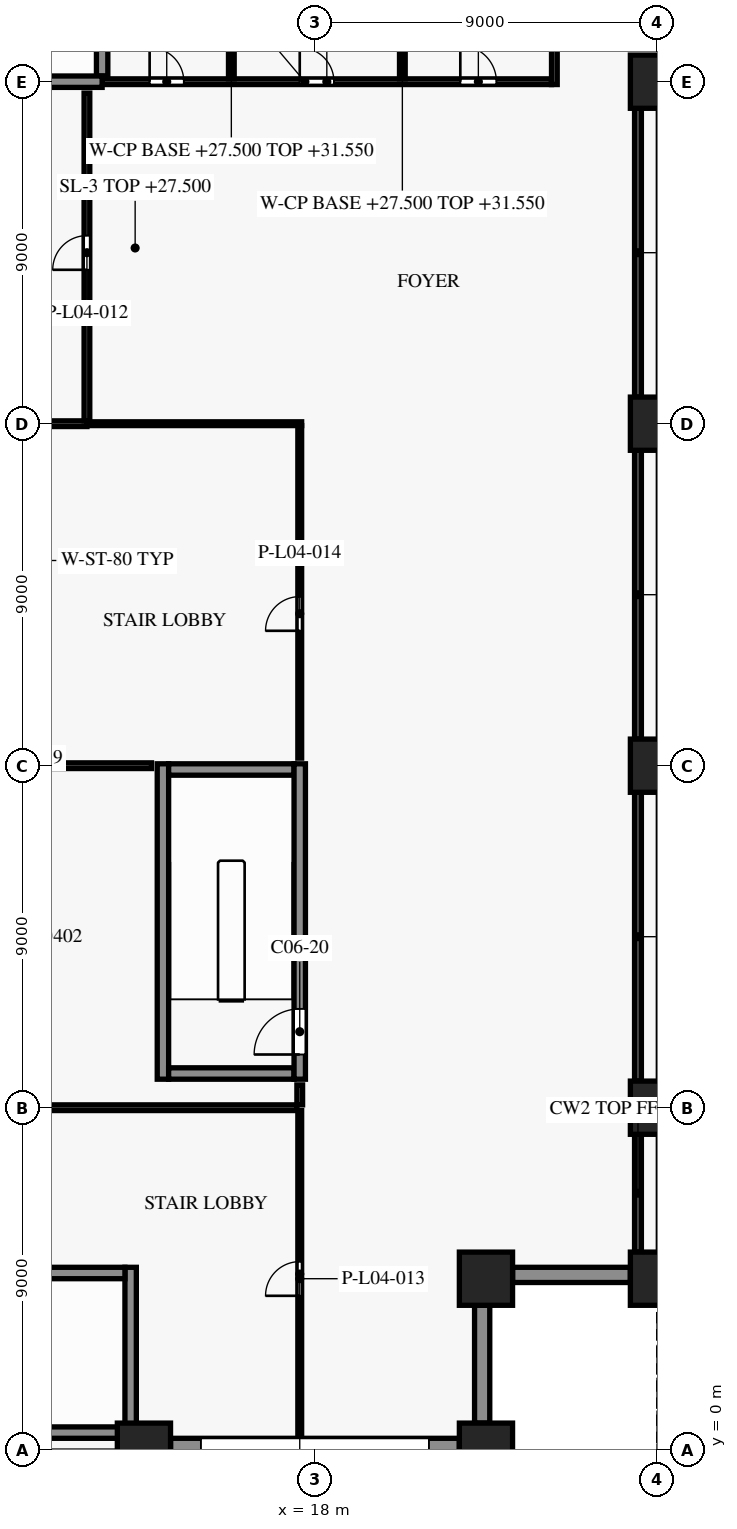
"""IFC4 building model, lengths in metres.
Left out: names, types, materials, properties, quantities, classifications, styles, units other than length and angle.
Written with IfcOpenShell. Run it as: python <this file> out.ifc"""

import sys

from ifc_helpers import new_model, si_unit, direction, frame, frame_2d, origin, origin_2d, place, context, subcontext, project, spatial, rectangle, extrude, element, fill, save


model = new_model("IFC4")
c1 = context("Model", 3, precision=1e-05, world=origin(), true_north=direction((0.0, 1.0)))
c2 = subcontext(c1, "Body", "Model", "MODEL_VIEW")
j1 = project(units=[si_unit("LENGTHUNIT", "METRE"), si_unit("PLANEANGLEUNIT", "RADIAN")], contexts=[c1])
p1 = place(None, origin())
s1 = spatial("IfcSite", under=j1, at=p1, CompositionType="ELEMENT")
p2 = place(p1, origin())
s2 = spatial("IfcBuilding", under=s1, at=p2, CompositionType="ELEMENT")
p3 = place(p2, frame((0.0, 0.0, 27.5)))
s3 = spatial("IfcBuildingStorey", under=s2, at=p3, CompositionType="ELEMENT", Elevation=27.5)
for number, where, z_axis, x_axis in (
    (1, (13.5, 0.0, 0.0), (0.0, 0.0, 1.0), (1.0, 0.0, 0.0)),
    (2, (22.5, 0.0, 0.0), (0.0, 0.0, 1.0), (1.0, 0.0, 0.0)),
    (3, (27.0, 4.5, 0.0), (0.0, 0.0, 1.0), (1.0, 0.0, 0.0)),
    (4, (27.0, 9.0, 0.0), (0.0, 0.0, 1.0), (1.0, 0.0, 0.0)),
    (5, (27.0, 18.0, 0.0), (0.0, 0.0, 1.0), (1.0, 0.0, 0.0)),
    (6, (27.0, 27.0, 0.0), (0.0, 0.0, 1.0), (1.0, 0.0, 0.0)),
    (7, (27.0, 36.0, 0.0), (0.0, 0.0, 1.0), (1.0, 0.0, 0.0)),
    (8, (22.5, 4.5, 0.0), (0.0, 0.0, 1.0), (1.0, 0.0, 0.0)),
):
    element("IfcColumn", number, at=place(p3, frame(where, z_axis=z_axis, x_axis=x_axis)), inside=s3, PredefinedType="COLUMN", context=c2, shape_type="SweptSolid", body=[
        extrude(rectangle(XDim=1.4, YDim=1.4, at=origin_2d()), origin(), (0.0, 0.0, 1.0), 4.5),
    ])
p4 = place(p3, frame((21.8, 0.1, 0.0), z_axis=(0.0, 0.0, 1.0), x_axis=(-1.0, 0.0, 0.0)))
e9 = element("IfcWall", 9, at=p4, inside=s3, PredefinedType="SOLIDWALL", context=c2, shape_type="SweptSolid", body=[
    extrude(rectangle(XDim=7.6, YDim=0.4, at=frame_2d((3.8, 0.0))), origin(), (0.0, 0.0, 1.0), 3.6),
])
p5 = place(p4, frame((0.8, 0.0, 0.9)))
e10 = element("IfcOpeningElement", 10, at=p5, cuts=e9, PredefinedType="OPENING", context=c2, shape_type="SweptSolid", body=[
    extrude(rectangle(XDim=6.0, YDim=1.8, at=frame_2d((3.0, 0.9))), frame((0.0, 0.21, 0.0), z_axis=(0.0, -1.0, 0.0), x_axis=(1.0, 0.0, 0.0)), (0.0, 0.0, 1.0), 0.42),
])
for number, where, z_axis, x_axis in (
    (11, (22.4, 3.8, 0.0), (0.0, 0.0, 1.0), (0.0, -1.0, 0.0)),
    (12, (26.3, 4.6, 0.0), (0.0, 0.0, 1.0), (-1.0, 0.0, 0.0)),
):
    element("IfcWall", number, at=place(p3, frame(where, z_axis=z_axis, x_axis=x_axis)), inside=s3, PredefinedType="SOLIDWALL", context=c2, shape_type="SweptSolid", body=[
        extrude(rectangle(XDim=3.1, YDim=0.4, at=frame_2d((1.55, 0.0))), origin(), (0.0, 0.0, 1.0), 3.6),
    ])
p6 = place(p3, frame((5.0, 0.45, 0.0), z_axis=(0.0, 0.0, 1.0), x_axis=(1.0, 0.0, 0.0)))
e13 = element("IfcWall", 13, at=p6, inside=s3, PredefinedType="SHEAR", context=c2, shape_type="SweptSolid", body=[
    extrude(rectangle(XDim=8.0, YDim=0.3, at=frame_2d((4.0, 0.0))), origin(), (0.0, 0.0, 1.0), 4.2),
])
p7 = place(p3, frame((5.0, 4.65, 0.0), z_axis=(0.0, 0.0, 1.0), x_axis=(1.0, 0.0, 0.0)))
e14 = element("IfcWall", 14, at=p7, inside=s3, PredefinedType="SHEAR", context=c2, shape_type="SweptSolid", body=[
    extrude(rectangle(XDim=8.0, YDim=0.3, at=frame_2d((4.0, 0.0))), origin(), (0.0, 0.0, 1.0), 4.2),
])
p8 = place(p7, frame((0.5, 0.0, 0.0)))
e15 = element("IfcOpeningElement", 15, at=p8, cuts=e14, PredefinedType="OPENING", context=c2, shape_type="SweptSolid", body=[
    extrude(rectangle(XDim=1.2, YDim=2.2, at=frame_2d((0.6, 1.1))), frame((0.0, 0.16, 0.0), z_axis=(0.0, -1.0, 0.0), x_axis=(1.0, 0.0, 0.0)), (0.0, 0.0, 1.0), 0.32),
])
for number, where, z_axis, x_axis in (
    (16, (14.15, 9.9, 0.0), (0.0, 0.0, 1.0), (1.0, 0.0, 0.0)),
    (17, (14.15, 17.9, 0.0), (0.0, 0.0, 1.0), (1.0, 0.0, 0.0)),
):
    element("IfcWall", number, at=place(p3, frame(where, z_axis=z_axis, x_axis=x_axis)), inside=s3, PredefinedType="SHEAR", context=c2, shape_type="SweptSolid", body=[
        extrude(rectangle(XDim=3.3, YDim=0.3, at=frame_2d((1.65, 0.0))), origin(), (0.0, 0.0, 1.0), 4.2),
    ])
p9 = place(p3, frame((12.4, 36.0, 0.0), z_axis=(0.0, 0.0, 1.0), x_axis=(1.0, 0.0, 0.0)))
e18 = element("IfcWall", 18, at=p9, inside=s3, PredefinedType="SHEAR", context=c2, shape_type="SweptSolid", body=[
    extrude(rectangle(XDim=11.825, YDim=0.15, at=frame_2d((5.913, 0.0))), origin(), (0.0, 0.0, 1.0), 4.2),
])
p10 = place(p9, frame((1.25, 0.0, 0.0)))
e19 = element("IfcOpeningElement", 19, at=p10, cuts=e18, PredefinedType="OPENING", context=c2, shape_type="SweptSolid", body=[
    extrude(rectangle(XDim=0.9, YDim=2.1, at=frame_2d((0.45, 1.05))), frame((0.0, 0.085, 0.0), z_axis=(0.0, -1.0, 0.0), x_axis=(1.0, 0.0, 0.0)), (0.0, 0.0, 1.0), 0.17),
])
p11 = place(p9, frame((5.2, 0.0, 0.0)))
e20 = element("IfcOpeningElement", 20, at=p11, cuts=e18, PredefinedType="OPENING", context=c2, shape_type="SweptSolid", body=[
    extrude(rectangle(XDim=0.9, YDim=2.1, at=frame_2d((0.45, 1.05))), frame((0.0, 0.085, 0.0), z_axis=(0.0, -1.0, 0.0), x_axis=(1.0, 0.0, 0.0)), (0.0, 0.0, 1.0), 0.17),
])
p12 = place(p9, frame((9.425, 0.0, 0.0)))
e21 = element("IfcOpeningElement", 21, at=p12, cuts=e18, PredefinedType="OPENING", context=c2, shape_type="SweptSolid", body=[
    extrude(rectangle(XDim=0.95, YDim=2.1, at=frame_2d((0.475, 1.05))), frame((0.0, 0.085, 0.0), z_axis=(0.0, -1.0, 0.0), x_axis=(1.0, 0.0, 0.0)), (0.0, 0.0, 1.0), 0.17),
])
p13 = place(p3, frame((4.4, 36.0, 0.0), z_axis=(0.0, 0.0, 1.0), x_axis=(1.0, 0.0, 0.0)))
e22 = element("IfcWall", 22, at=p13, inside=s3, PredefinedType="SHEAR", context=c2, shape_type="SweptSolid", body=[
    extrude(rectangle(XDim=8.0, YDim=0.3, at=frame_2d((4.0, 0.0))), origin(), (0.0, 0.0, 1.0), 4.2),
])
p14 = place(p13, frame((0.3, 0.0, 0.0)))
e23 = element("IfcOpeningElement", 23, at=p14, cuts=e22, PredefinedType="OPENING", context=c2, shape_type="SweptSolid", body=[
    extrude(rectangle(XDim=1.5, YDim=2.2, at=frame_2d((0.75, 1.1))), frame((0.0, 0.16, 0.0), z_axis=(0.0, -1.0, 0.0), x_axis=(1.0, 0.0, 0.0)), (0.0, 0.0, 1.0), 0.32),
])
p15 = place(p3, frame((12.4, 36.15, 0.0), z_axis=(0.0, 0.0, 1.0), x_axis=(0.0, 1.0, 0.0)))
e24 = element("IfcWall", 24, at=p15, inside=s3, PredefinedType="SHEAR", context=c2, shape_type="SweptSolid", body=[
    extrude(rectangle(XDim=3.725, YDim=0.3, at=frame_2d((1.863, 0.0))), origin(), (0.0, 0.0, 1.0), 4.2),
])
p16 = place(p3, frame((13.15, 0.3, 0.0), z_axis=(0.0, 0.0, 1.0), x_axis=(0.0, 1.0, 0.0)))
e25 = element("IfcWall", 25, at=p16, inside=s3, PredefinedType="SHEAR", context=c2, shape_type="SweptSolid", body=[
    extrude(rectangle(XDim=4.5, YDim=0.3, at=frame_2d((2.25, 0.0))), origin(), (0.0, 0.0, 1.0), 4.2),
])
p17 = place(p3, frame((14.0, 9.75, 0.0), z_axis=(0.0, 0.0, 1.0), x_axis=(0.0, 1.0, 0.0)))
e26 = element("IfcWall", 26, at=p17, inside=s3, PredefinedType="SHEAR", context=c2, shape_type="SweptSolid", body=[
    extrude(rectangle(XDim=8.3, YDim=0.3, at=frame_2d((4.15, 0.0))), origin(), (0.0, 0.0, 1.0), 4.2),
])
p18 = place(p3, frame((15.8, 36.075, 0.0), z_axis=(0.0, 0.0, 1.0), x_axis=(0.0, 1.0, 0.0)))
e27 = element("IfcWall", 27, at=p18, inside=s3, PredefinedType="PARTITIONING", context=c2, shape_type="SweptSolid", body=[
    extrude(rectangle(XDim=3.8, YDim=0.15, at=frame_2d((1.9, 0.0))), origin(), (0.0, 0.0, 1.0), 4.05),
])
p19 = place(p3, frame((17.6, 9.75, 0.0), z_axis=(0.0, 0.0, 1.0), x_axis=(0.0, 1.0, 0.0)))
e28 = element("IfcWall", 28, at=p19, inside=s3, PredefinedType="SHEAR", context=c2, shape_type="SweptSolid", body=[
    extrude(rectangle(XDim=8.3, YDim=0.3, at=frame_2d((4.15, 0.0))), origin(), (0.0, 0.0, 1.0), 4.2),
])
p20 = place(p19, frame((0.65, 0.0, 0.0)))
e29 = element("IfcOpeningElement", 29, at=p20, cuts=e28, PredefinedType="OPENING", context=c2, shape_type="SweptSolid", body=[
    extrude(rectangle(XDim=1.2, YDim=2.2, at=frame_2d((0.6, 1.1))), frame((0.0, 0.16, 0.0), z_axis=(0.0, -1.0, 0.0), x_axis=(1.0, 0.0, 0.0)), (0.0, 0.0, 1.0), 0.32),
])
p21 = place(p3, frame((20.3, 36.075, 0.0), z_axis=(0.0, 0.0, 1.0), x_axis=(0.0, 1.0, 0.0)))
e30 = element("IfcWall", 30, at=p21, inside=s3, PredefinedType="PARTITIONING", context=c2, shape_type="SweptSolid", body=[
    extrude(rectangle(XDim=3.8, YDim=0.15, at=frame_2d((1.9, 0.0))), origin(), (0.0, 0.0, 1.0), 4.05),
])
p22 = place(p3, frame((24.3, 35.925, 0.0), z_axis=(0.0, 0.0, 1.0), x_axis=(0.0, 1.0, 0.0)))
e31 = element("IfcWall", 31, at=p22, inside=s3, PredefinedType="SHEAR", context=c2, shape_type="SweptSolid", body=[
    extrude(rectangle(XDim=4.075, YDim=0.15, at=frame_2d((2.038, 0.0))), origin(), (0.0, 0.0, 1.0), 4.2),
])
p23 = place(p3, frame((17.6, 0.32, 0.0), z_axis=(0.0, 0.0, 1.0), x_axis=(0.0, 1.0, 0.0)))
e32 = element("IfcWall", 32, at=p23, inside=s3, PredefinedType="PARTITIONING", context=c2, shape_type="SweptSolid", body=[
    extrude(rectangle(XDim=8.605, YDim=0.1, at=frame_2d((4.302, 0.0))), origin(), (0.0, 0.0, 1.0), 3.33),
])
p24 = place(p23, frame((3.73, 0.0, 0.0)))
e33 = element("IfcOpeningElement", 33, at=p24, cuts=e32, PredefinedType="OPENING", context=c2, shape_type="SweptSolid", body=[
    extrude(rectangle(XDim=0.9, YDim=2.1, at=frame_2d((0.45, 1.05))), frame((0.0, 0.06, 0.0), z_axis=(0.0, -1.0, 0.0), x_axis=(1.0, 0.0, 0.0)), (0.0, 0.0, 1.0), 0.12),
])
p25 = place(p3, frame((0.72, 9.0, 0.0), z_axis=(0.0, 0.0, 1.0), x_axis=(1.0, 0.0, 0.0)))
e34 = element("IfcWall", 34, at=p25, inside=s3, PredefinedType="PARTITIONING", context=c2, shape_type="SweptSolid", body=[
    extrude(rectangle(XDim=16.805, YDim=0.15, at=frame_2d((8.402, 0.0))), origin(), (0.0, 0.0, 1.0), 3.33),
])
p26 = place(p3, frame((17.6, 9.075, 0.0), z_axis=(0.0, 0.0, 1.0), x_axis=(0.0, 1.0, 0.0)))
e35 = element("IfcWall", 35, at=p26, inside=s3, PredefinedType="PARTITIONING", context=c2, shape_type="SweptSolid", body=[
    extrude(rectangle(XDim=0.525, YDim=0.15, at=frame_2d((0.263, 0.0))), origin(), (0.0, 0.0, 1.0), 3.33),
])
p27 = place(p3, frame((13.7, 18.0, 0.0), z_axis=(0.0, 0.0, 1.0), x_axis=(-1.0, 0.0, 0.0)))
e36 = element("IfcWall", 36, at=p27, inside=s3, PredefinedType="PARTITIONING", context=c2, shape_type="SweptSolid", body=[
    extrude(rectangle(XDim=13.88, YDim=0.15, at=frame_2d((6.94, 0.0))), origin(), (0.0, 0.0, 1.0), 3.33),
])
p28 = place(p27, frame((10.25, 0.0, 0.0)))
e37 = element("IfcOpeningElement", 37, at=p28, cuts=e36, PredefinedType="OPENING", context=c2, shape_type="SweptSolid", body=[
    extrude(rectangle(XDim=0.9, YDim=2.1, at=frame_2d((0.45, 1.05))), frame((0.0, 0.085, 0.0), z_axis=(0.0, -1.0, 0.0), x_axis=(1.0, 0.0, 0.0)), (0.0, 0.0, 1.0), 0.17),
])
p29 = place(p3, frame((17.6, 18.2, 0.0), z_axis=(0.0, 0.0, 1.0), x_axis=(0.0, 1.0, 0.0)))
e38 = element("IfcWall", 38, at=p29, inside=s3, PredefinedType="PARTITIONING", context=c2, shape_type="SweptSolid", body=[
    extrude(rectangle(XDim=8.75, YDim=0.1, at=frame_2d((4.375, 0.0))), origin(), (0.0, 0.0, 1.0), 3.33),
])
p30 = place(p29, frame((3.35, 0.0, 0.0)))
e39 = element("IfcOpeningElement", 39, at=p30, cuts=e38, PredefinedType="OPENING", context=c2, shape_type="SweptSolid", body=[
    extrude(rectangle(XDim=0.9, YDim=2.1, at=frame_2d((0.45, 1.05))), frame((0.0, 0.06, 0.0), z_axis=(0.0, -1.0, 0.0), x_axis=(1.0, 0.0, 0.0)), (0.0, 0.0, 1.0), 0.12),
])
p31 = place(p3, frame((10.9, 27.0, 0.0), z_axis=(0.0, 0.0, 1.0), x_axis=(1.0, 0.0, 0.0)))
e40 = element("IfcWall", 40, at=p31, inside=s3, PredefinedType="PARTITIONING", context=c2, shape_type="SweptSolid", body=[
    extrude(rectangle(XDim=1.1, YDim=0.15, at=frame_2d((0.55, 0.0))), origin(), (0.0, 0.0, 1.0), 3.33),
])
p32 = place(p3, frame((17.65, 27.0, 0.0), z_axis=(0.0, 0.0, 1.0), x_axis=(-1.0, 0.0, 0.0)))
e41 = element("IfcWall", 41, at=p32, inside=s3, PredefinedType="PARTITIONING", context=c2, shape_type="SweptSolid", body=[
    extrude(rectangle(XDim=5.65, YDim=0.1, at=frame_2d((2.825, 0.0))), origin(), (0.0, 0.0, 1.0), 3.33),
])
p33 = place(p3, frame((12.0, 27.075, 0.0), z_axis=(0.0, 0.0, 1.0), x_axis=(0.0, 1.0, 0.0)))
e42 = element("IfcWall", 42, at=p33, inside=s3, PredefinedType="PARTITIONING", context=c2, shape_type="SweptSolid", body=[
    extrude(rectangle(XDim=8.625, YDim=0.15, at=frame_2d((4.312, 0.0))), origin(), (0.0, 0.0, 1.0), 3.33),
])
p34 = place(p33, frame((3.975, 0.0, 0.0)))
e43 = element("IfcOpeningElement", 43, at=p34, cuts=e42, PredefinedType="OPENING", context=c2, shape_type="SweptSolid", body=[
    extrude(rectangle(XDim=0.9, YDim=2.1, at=frame_2d((0.45, 1.05))), frame((0.0, 0.085, 0.0), z_axis=(0.0, -1.0, 0.0), x_axis=(1.0, 0.0, 0.0)), (0.0, 0.0, 1.0), 0.17),
])
p35 = place(p5, origin())
e44 = element("IfcWindow", 44, at=p35, inside=s3, PartitioningType="SINGLE_PANEL", PredefinedType="WINDOW", context=c2, shape_type="SweptSolid", body=[
    extrude(rectangle(XDim=6.0, YDim=1.8, at=frame_2d((3.0, 0.9))), frame((0.0, 0.03, 0.0), z_axis=(0.0, -1.0, 0.0), x_axis=(1.0, 0.0, 0.0)), (0.0, 0.0, 1.0), 0.06),
])
fill(e10, e44)
p36 = place(p10, origin())
e45 = element("IfcDoor", 45, at=p36, inside=s3, OperationType="SINGLE_SWING_RIGHT", PredefinedType="DOOR", context=c2, shape_type="SweptSolid", body=[
    extrude(rectangle(XDim=0.9, YDim=2.1, at=frame_2d((0.45, 1.05))), frame((0.0, 0.025, 0.0), z_axis=(0.0, -1.0, 0.0), x_axis=(1.0, 0.0, 0.0)), (0.0, 0.0, 1.0), 0.05),
])
fill(e19, e45)
p37 = place(p11, origin())
e46 = element("IfcDoor", 46, at=p37, inside=s3, OperationType="SINGLE_SWING_LEFT", PredefinedType="DOOR", context=c2, shape_type="SweptSolid", body=[
    extrude(rectangle(XDim=0.9, YDim=2.1, at=frame_2d((0.45, 1.05))), frame((0.0, 0.025, 0.0), z_axis=(0.0, -1.0, 0.0), x_axis=(1.0, 0.0, 0.0)), (0.0, 0.0, 1.0), 0.05),
])
fill(e20, e46)
p38 = place(p12, origin())
e47 = element("IfcDoor", 47, at=p38, inside=s3, OperationType="SINGLE_SWING_RIGHT", PredefinedType="DOOR", context=c2, shape_type="SweptSolid", body=[
    extrude(rectangle(XDim=0.95, YDim=2.1, at=frame_2d((0.475, 1.05))), frame((0.0, 0.025, 0.0), z_axis=(0.0, -1.0, 0.0), x_axis=(1.0, 0.0, 0.0)), (0.0, 0.0, 1.0), 0.05),
])
fill(e21, e47)
p39 = place(p20, origin())
e48 = element("IfcDoor", 48, at=p39, inside=s3, OperationType="SINGLE_SWING_LEFT", PredefinedType="DOOR", context=c2, shape_type="SweptSolid", body=[
    extrude(rectangle(XDim=1.2, YDim=2.2, at=frame_2d((0.6, 1.1))), frame((0.0, 0.025, 0.0), z_axis=(0.0, -1.0, 0.0), x_axis=(1.0, 0.0, 0.0)), (0.0, 0.0, 1.0), 0.05),
])
fill(e29, e48)
p40 = place(p34, origin())
e49 = element("IfcDoor", 49, at=p40, inside=s3, OperationType="SINGLE_SWING_RIGHT", PredefinedType="DOOR", context=c2, shape_type="SweptSolid", body=[
    extrude(rectangle(XDim=0.9, YDim=2.1, at=frame_2d((0.45, 1.05))), frame((0.0, 0.025, 0.0), z_axis=(0.0, -1.0, 0.0), x_axis=(1.0, 0.0, 0.0)), (0.0, 0.0, 1.0), 0.05),
])
fill(e43, e49)
p41 = place(p24, origin())
e50 = element("IfcDoor", 50, at=p41, inside=s3, OperationType="SINGLE_SWING_LEFT", PredefinedType="DOOR", context=c2, shape_type="SweptSolid", body=[
    extrude(rectangle(XDim=0.9, YDim=2.1, at=frame_2d((0.45, 1.05))), frame((0.0, 0.025, 0.0), z_axis=(0.0, -1.0, 0.0), x_axis=(1.0, 0.0, 0.0)), (0.0, 0.0, 1.0), 0.05),
])
fill(e33, e50)
p42 = place(p30, origin())
e51 = element("IfcDoor", 51, at=p42, inside=s3, OperationType="SINGLE_SWING_LEFT", PredefinedType="DOOR", context=c2, shape_type="SweptSolid", body=[
    extrude(rectangle(XDim=0.9, YDim=2.1, at=frame_2d((0.45, 1.05))), frame((0.0, 0.025, 0.0), z_axis=(0.0, -1.0, 0.0), x_axis=(1.0, 0.0, 0.0)), (0.0, 0.0, 1.0), 0.05),
])
fill(e39, e51)
save(model, sys.argv[1])
